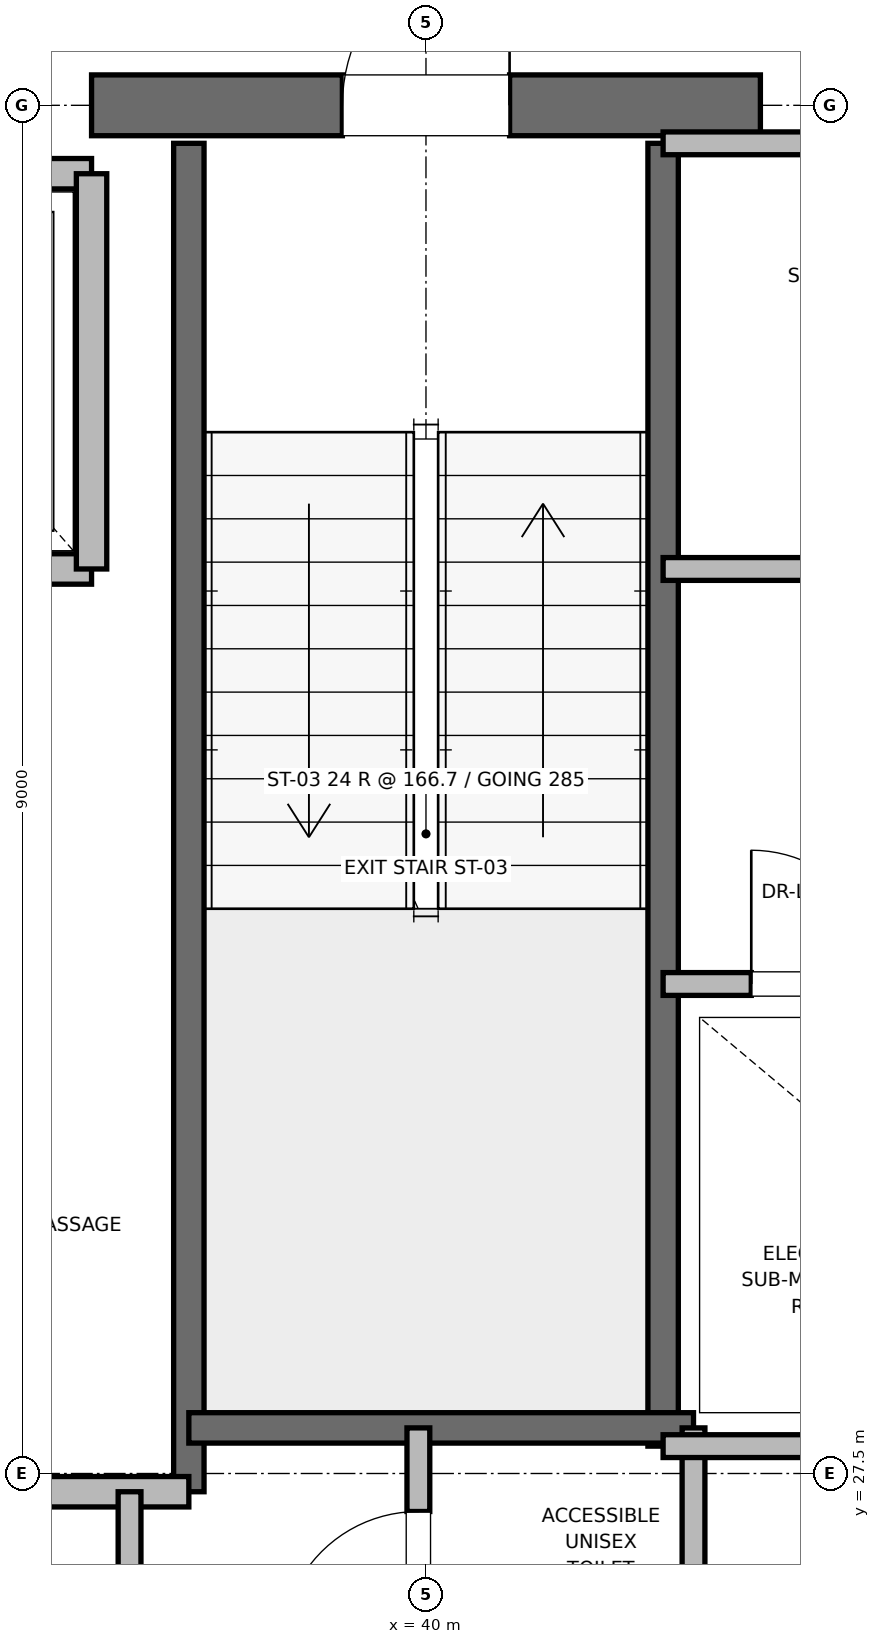
"""IFC4 building model, lengths in metres.
Left out: names, types, materials, properties, quantities, classifications, styles, units other than length and angle.
Written with IfcOpenShell. Run it as: python <this file> out.ifc"""

import sys

from ifc_helpers import new_model, si_unit, direction, frame, frame_2d, origin, place, context, subcontext, project, spatial, rectangle, extrude, element, fill, save


model = new_model("IFC4")
c1 = context("Model", 3, precision=1e-05, world=origin(), true_north=direction((0.0, 1.0)))
c2 = subcontext(c1, "Body", "Model", "MODEL_VIEW")
j1 = project(units=[si_unit("LENGTHUNIT", "METRE"), si_unit("PLANEANGLEUNIT", "RADIAN")], contexts=[c1])
p1 = place(None, origin())
s1 = spatial("IfcSite", under=j1, at=p1, CompositionType="ELEMENT")
p2 = place(p1, origin())
s2 = spatial("IfcBuilding", under=s1, at=p2, CompositionType="ELEMENT")
p3 = place(p2, frame((0.0, 0.0, 318.8)))
s3 = spatial("IfcBuildingStorey", under=s2, at=p3, CompositionType="ELEMENT", Elevation=318.8)
p4 = place(p3, frame((37.8, 36.5, 0.0), z_axis=(0.0, 0.0, 1.0), x_axis=(1.0, 0.0, 0.0)))
e1 = element("IfcWall", 1, at=p4, inside=s3, PredefinedType="SHEAR", context=c2, shape_type="SweptSolid", body=[
    extrude(rectangle(XDim=4.4, YDim=0.4, at=frame_2d((2.2, 0.0))), origin(), (0.0, 0.0, 1.0), 3.785),
])
p5 = place(p4, frame((1.65, 0.0, 0.0)))
e2 = element("IfcOpeningElement", 2, at=p5, cuts=e1, PredefinedType="OPENING", context=c2, shape_type="SweptSolid", body=[
    extrude(rectangle(XDim=1.1, YDim=2.15, at=frame_2d((0.55, 1.075))), frame((0.0, 0.2, 0.0), z_axis=(0.0, -1.0, 0.0), x_axis=(1.0, 0.0, 0.0)), (0.0, 0.0, 1.0), 0.4),
])
p6 = place(p3, frame((38.44, 27.38, 0.0), z_axis=(0.0, 0.0, 1.0), x_axis=(0.0, 1.0, 0.0)))
e3 = element("IfcWall", 3, at=p6, inside=s3, PredefinedType="SOLIDWALL", context=c2, shape_type="SweptSolid", body=[
    extrude(rectangle(XDim=8.87, YDim=0.2, at=frame_2d((4.435, 0.0))), origin(), (0.0, 0.0, 1.0), 3.785),
])
p7 = place(p3, frame((41.56, 27.68, 0.0), z_axis=(0.0, 0.0, 1.0), x_axis=(0.0, 1.0, 0.0)))
e4 = element("IfcWall", 4, at=p7, inside=s3, PredefinedType="SOLIDWALL", context=c2, shape_type="SweptSolid", body=[
    extrude(rectangle(XDim=8.57, YDim=0.2, at=frame_2d((4.285, 0.0))), origin(), (0.0, 0.0, 1.0), 3.785),
])
p8 = place(p3, frame((38.44, 27.8, 0.0), z_axis=(0.0, 0.0, 1.0), x_axis=(1.0, 0.0, 0.0)))
e5 = element("IfcWall", 5, at=p8, inside=s3, PredefinedType="SOLIDWALL", context=c2, shape_type="SweptSolid", body=[
    extrude(rectangle(XDim=3.32, YDim=0.2, at=frame_2d((1.66, 0.0))), origin(), (0.0, 0.0, 1.0), 3.785),
])
p9 = place(p3, frame((32.82, 27.38, 0.0), z_axis=(0.0, 0.0, 1.0), x_axis=(1.0, 0.0, 0.0)))
e6 = element("IfcWall", 6, at=p9, inside=s3, PredefinedType="PARTITIONING", context=c2, shape_type="SweptSolid", body=[
    extrude(rectangle(XDim=5.62, YDim=0.2, at=frame_2d((2.81, 0.0))), origin(), (0.0, 0.0, 1.0), 3.785),
])
p10 = place(p3, frame((35.5, 33.45, 0.0), z_axis=(0.0, 0.0, 1.0), x_axis=(1.0, 0.0, 0.0)))
e7 = element("IfcWall", 7, at=p10, inside=s3, PredefinedType="SOLIDWALL", context=c2, shape_type="SweptSolid", body=[
    extrude(rectangle(XDim=2.3, YDim=0.2, at=frame_2d((1.15, 0.0))), origin(), (0.0, 0.0, 1.0), 3.785),
])
p11 = place(p10, frame((0.6, 0.0, 0.0)))
e8 = element("IfcOpeningElement", 8, at=p11, cuts=e7, PredefinedType="OPENING", context=c2, shape_type="SweptSolid", body=[
    extrude(rectangle(XDim=1.1, YDim=2.2, at=frame_2d((0.55, 1.1))), frame((0.0, 0.1, 0.0), z_axis=(0.0, -1.0, 0.0), x_axis=(1.0, 0.0, 0.0)), (0.0, 0.0, 1.0), 0.2),
])
p12 = place(p3, frame((37.8, 36.05, 0.0), z_axis=(0.0, 0.0, 1.0), x_axis=(-1.0, 0.0, 0.0)))
e9 = element("IfcWall", 9, at=p12, inside=s3, PredefinedType="SOLIDWALL", context=c2, shape_type="SweptSolid", body=[
    extrude(rectangle(XDim=2.3, YDim=0.2, at=frame_2d((1.15, 0.0))), origin(), (0.0, 0.0, 1.0), 2.865),
])
p13 = place(p3, frame((37.8, 33.45, 0.0), z_axis=(0.0, 0.0, 1.0), x_axis=(0.0, 1.0, 0.0)))
e10 = element("IfcWall", 10, at=p13, inside=s3, PredefinedType="SOLIDWALL", context=c2, shape_type="SweptSolid", body=[
    extrude(rectangle(XDim=2.6, YDim=0.2, at=frame_2d((1.3, 0.0))), origin(), (0.0, 0.0, 1.0), 2.865),
])
p14 = place(p3, frame((41.76, 23.8, 0.0), z_axis=(0.0, 0.0, 1.0), x_axis=(0.0, 1.0, 0.0)))
e11 = element("IfcWall", 11, at=p14, inside=s3, PredefinedType="PARTITIONING", context=c2, shape_type="SweptSolid", body=[
    extrude(rectangle(XDim=4.0, YDim=0.15, at=frame_2d((2.0, 0.0))), origin(), (0.0, 0.0, 1.0), 2.85),
])
p15 = place(p3, frame((39.95, 25.8, 0.0), z_axis=(0.0, 0.0, 1.0), x_axis=(0.0, 1.0, 0.0)))
e12 = element("IfcWall", 12, at=p15, inside=s3, PredefinedType="PARTITIONING", context=c2, shape_type="SweptSolid", body=[
    extrude(rectangle(XDim=2.0, YDim=0.15, at=frame_2d((1.0, 0.0))), origin(), (0.0, 0.0, 1.0), 2.85),
])
p16 = place(p15, frame((0.55, 0.0, 0.0)))
e13 = element("IfcOpeningElement", 13, at=p16, cuts=e12, PredefinedType="OPENING", context=c2, shape_type="SweptSolid", body=[
    extrude(rectangle(XDim=0.9, YDim=2.1, at=frame_2d((0.45, 1.05))), frame((0.0, 0.075, 0.0), z_axis=(0.0, -1.0, 0.0), x_axis=(1.0, 0.0, 0.0)), (0.0, 0.0, 1.0), 0.15),
])
p17 = place(p3, frame((38.05, 24.5, 0.0), z_axis=(0.0, 0.0, 1.0), x_axis=(0.0, 1.0, 0.0)))
e14 = element("IfcWall", 14, at=p17, inside=s3, PredefinedType="PARTITIONING", context=c2, shape_type="SweptSolid", body=[
    extrude(rectangle(XDim=2.88, YDim=0.15, at=frame_2d((1.44, 0.0))), origin(), (0.0, 0.0, 1.0), 2.85),
])
p18 = place(p17, frame((0.94, 0.0, 0.0)))
e15 = element("IfcOpeningElement", 15, at=p18, cuts=e14, PredefinedType="OPENING", context=c2, shape_type="SweptSolid", body=[
    extrude(rectangle(XDim=1.0, YDim=2.15, at=frame_2d((0.5, 1.075))), frame((0.0, 0.075, 0.0), z_axis=(0.0, -1.0, 0.0), x_axis=(1.0, 0.0, 0.0)), (0.0, 0.0, 1.0), 0.15),
])
p19 = place(p3, frame((41.56, 27.68, 0.0), z_axis=(0.0, 0.0, 1.0), x_axis=(1.0, 0.0, 0.0)))
e16 = element("IfcWall", 16, at=p19, inside=s3, PredefinedType="PARTITIONING", context=c2, shape_type="SweptSolid", body=[
    extrude(rectangle(XDim=3.59, YDim=0.15, at=frame_2d((1.795, 0.0))), origin(), (0.0, 0.0, 1.0), 2.85),
])
p20 = place(p3, frame((41.56, 30.72, 0.0), z_axis=(0.0, 0.0, 1.0), x_axis=(1.0, 0.0, 0.0)))
e17 = element("IfcWall", 17, at=p20, inside=s3, PredefinedType="PARTITIONING", context=c2, shape_type="SweptSolid", body=[
    extrude(rectangle(XDim=2.04, YDim=0.15, at=frame_2d((1.02, 0.0))), origin(), (0.0, 0.0, 1.0), 2.85),
])
p21 = place(p20, frame((0.58, 0.0, 0.0)))
e18 = element("IfcOpeningElement", 18, at=p21, cuts=e17, PredefinedType="OPENING", context=c2, shape_type="SweptSolid", body=[
    extrude(rectangle(XDim=0.88, YDim=2.1, at=frame_2d((0.44, 1.05))), frame((0.0, 0.075, 0.0), z_axis=(0.0, -1.0, 0.0), x_axis=(1.0, 0.0, 0.0)), (0.0, 0.0, 1.0), 0.15),
])
p22 = place(p3, frame((41.56, 36.25, 0.0), z_axis=(0.0, 0.0, 1.0), x_axis=(1.0, 0.0, 0.0)))
e19 = element("IfcWall", 19, at=p22, inside=s3, PredefinedType="PARTITIONING", context=c2, shape_type="SweptSolid", body=[
    extrude(rectangle(XDim=2.94, YDim=0.15, at=frame_2d((1.47, 0.0))), origin(), (0.0, 0.0, 1.0), 2.85),
])
p23 = place(p3, frame((41.56, 33.45, 0.0), z_axis=(0.0, 0.0, 1.0), x_axis=(1.0, 0.0, 0.0)))
e20 = element("IfcWall", 20, at=p23, inside=s3, PredefinedType="PARTITIONING", context=c2, shape_type="SweptSolid", body=[
    extrude(rectangle(XDim=2.94, YDim=0.15, at=frame_2d((1.47, 0.0))), origin(), (0.0, 0.0, 1.0), 2.85),
])
p24 = place(p23, frame((1.03, 0.0, 0.0)))
e21 = element("IfcOpeningElement", 21, at=p24, cuts=e20, PredefinedType="OPENING", context=c2, shape_type="SweptSolid", body=[
    extrude(rectangle(XDim=0.88, YDim=2.1, at=frame_2d((0.44, 1.05))), frame((0.0, 0.075, 0.0), z_axis=(0.0, -1.0, 0.0), x_axis=(1.0, 0.0, 0.0)), (0.0, 0.0, 1.0), 0.15),
])
p25 = place(p5, origin())
e22 = element("IfcDoor", 22, at=p25, inside=s3, OperationType="SINGLE_SWING_RIGHT", PredefinedType="DOOR", context=c2, shape_type="SweptSolid", body=[
    extrude(rectangle(XDim=1.1, YDim=2.15, at=frame_2d((0.55, 1.075))), frame((0.0, 0.025, 0.0), z_axis=(0.0, -1.0, 0.0), x_axis=(1.0, 0.0, 0.0)), (0.0, 0.0, 1.0), 0.05),
])
fill(e2, e22)
p26 = place(p16, origin())
e23 = element("IfcDoor", 23, at=p26, inside=s3, OperationType="SINGLE_SWING_LEFT", PredefinedType="DOOR", context=c2, shape_type="SweptSolid", body=[
    extrude(rectangle(XDim=0.9, YDim=2.1, at=frame_2d((0.45, 1.05))), frame((0.0, 0.025, 0.0), z_axis=(0.0, -1.0, 0.0), x_axis=(1.0, 0.0, 0.0)), (0.0, 0.0, 1.0), 0.05),
])
fill(e13, e23)
p27 = place(p21, origin())
e24 = element("IfcDoor", 24, at=p27, inside=s3, OperationType="SINGLE_SWING_LEFT", PredefinedType="DOOR", context=c2, shape_type="SweptSolid", body=[
    extrude(rectangle(XDim=0.88, YDim=2.1, at=frame_2d((0.44, 1.05))), frame((0.0, 0.025, 0.0), z_axis=(0.0, -1.0, 0.0), x_axis=(1.0, 0.0, 0.0)), (0.0, 0.0, 1.0), 0.05),
])
fill(e18, e24)
save(model, sys.argv[1])
